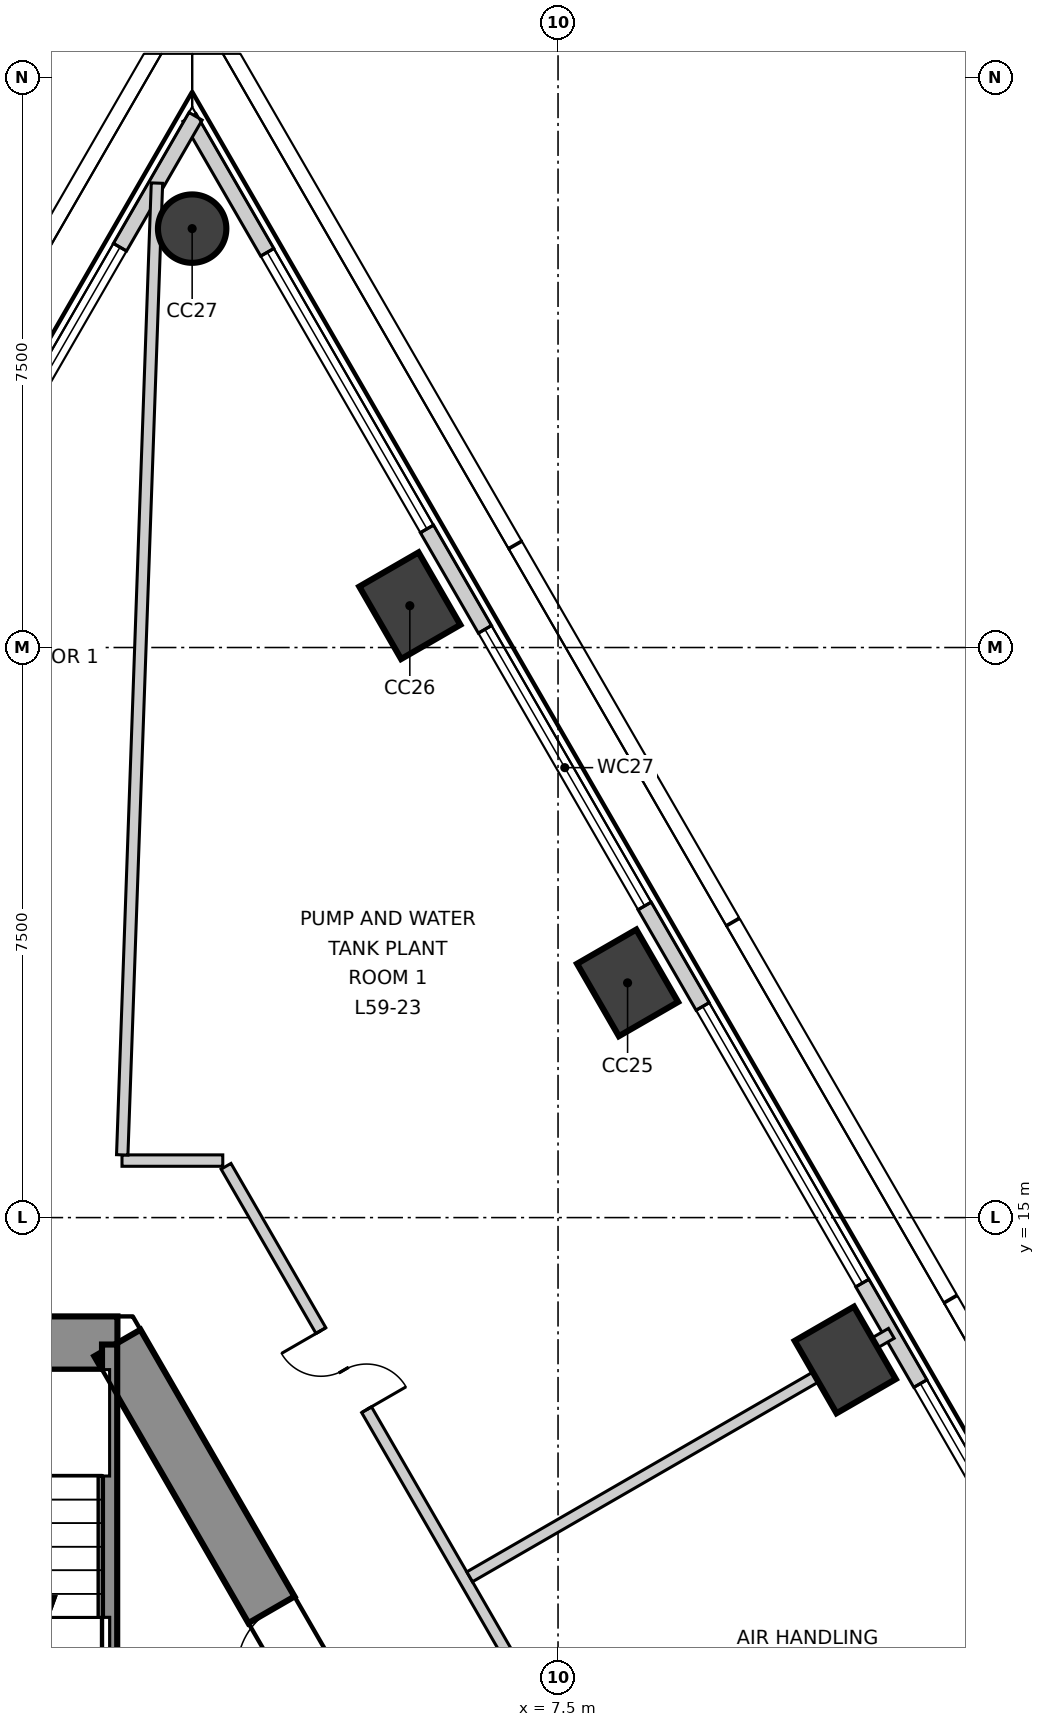
"""IFC4 building model, lengths in metres.
Left out: names, types, materials, properties, quantities, classifications, styles, units other than length and angle.
Written with IfcOpenShell. Run it as: python <this file> out.ifc"""

import sys

from ifc_helpers import new_model, si_unit, direction, frame, frame_2d, origin, origin_2d, place, context, subcontext, project, spatial, polyline, rectangle, circle, outline, extrude, element, fill, save


model = new_model("IFC4")
c1 = context("Model", 3, precision=1e-05, world=origin(), true_north=direction((0.0, 1.0)))
c2 = subcontext(c1, "Body", "Model", "MODEL_VIEW")
j1 = project(units=[si_unit("LENGTHUNIT", "METRE"), si_unit("PLANEANGLEUNIT", "RADIAN")], contexts=[c1])
p1 = place(None, origin())
s1 = spatial("IfcSite", under=j1, at=p1, CompositionType="ELEMENT")
p2 = place(p1, origin())
s2 = spatial("IfcBuilding", under=s1, at=p2, CompositionType="ELEMENT")
p3 = place(p2, frame((0.0, 0.0, 251.3)))
s3 = spatial("IfcBuildingStorey", under=s2, at=p3, CompositionType="ELEMENT", Elevation=251.3)
p4 = place(p3, frame((1.703, 13.35, -0.3), z_axis=(0.0, 0.0, 1.0), x_axis=(-1.0, 0.0, 0.0)))
e1 = element("IfcWall", 1, at=p4, inside=s3, PredefinedType="SHEAR", context=c2, shape_type="SweptSolid", body=[
    extrude(outline(polyline([(-0.202, -0.35), (1.703, -0.35), (3.608, -0.35), (3.204, 0.35), (1.703, 0.35), (0.202, 0.35), (-0.202, -0.35)])), origin(), (0.0, 0.0, 1.0), 4.2),
])
p5 = place(p4, frame((1.553, 0.0, 0.3)))
e2 = element("IfcOpeningElement", 2, at=p5, cuts=e1, PredefinedType="OPENING", context=c2, shape_type="SweptSolid", body=[
    extrude(rectangle(XDim=1.4, YDim=2.1, at=frame_2d((0.7, 1.05))), frame((0.0, 0.36, 0.0), z_axis=(0.0, -1.0, 0.0), x_axis=(1.0, 0.0, 0.0)), (0.0, 0.0, 1.0), 0.72),
])
p6 = place(p3, frame((12.413, -5.2, -0.3), z_axis=(0.0, 0.0, 1.0), x_axis=(-0.500011533395, 0.866018744874, 0.0)))
e3 = element("IfcWall", 3, at=p6, inside=s3, PredefinedType="SHEAR", context=c2, shape_type="SweptSolid", body=[
    extrude(outline(polyline([(-0.202, -0.35), (1.782, -0.35), (3.766, -0.35), (5.75, -0.35), (7.734, -0.35), (9.718, -0.35), (11.702, -0.35), (13.686, -0.35), (15.67, -0.35), (17.654, -0.35), (19.638, -0.35), (21.622, -0.35), (21.218, 0.35), (19.307, 0.35), (17.397, 0.35), (15.486, 0.35), (13.576, 0.35), (11.665, 0.35), (9.755, 0.35), (7.844, 0.35), (5.934, 0.35), (4.023, 0.35), (2.113, 0.35), (0.202, 0.35), (-0.202, -0.35)])), origin(), (0.0, 0.0, 1.0), 4.2),
])
p7 = place(p6, frame((4.055, 0.0, 0.3)))
e4 = element("IfcOpeningElement", 4, at=p7, cuts=e3, PredefinedType="OPENING", context=c2, shape_type="SweptSolid", body=[
    extrude(rectangle(XDim=0.9, YDim=2.1, at=frame_2d((0.45, 1.05))), frame((0.0, 0.36, 0.0), z_axis=(0.0, -1.0, 0.0), x_axis=(1.0, 0.0, 0.0)), (0.0, 0.0, 1.0), 0.72),
])
p8 = place(p6, frame((16.465, 0.0, 0.3)))
e5 = element("IfcOpeningElement", 5, at=p8, cuts=e3, PredefinedType="OPENING", context=c2, shape_type="SweptSolid", body=[
    extrude(rectangle(XDim=0.9, YDim=2.1, at=frame_2d((0.45, 1.05))), frame((0.0, 0.36, 0.0), z_axis=(0.0, -1.0, 0.0), x_axis=(1.0, 0.0, 0.0)), (0.0, 0.0, 1.0), 0.72),
])
for number, where, z_axis, x_axis in (
    (6, (11.279, 13.127, -0.3), (0.0, 0.0, 1.0), (-0.5, 0.866, 0.0)),
    (7, (8.415, 18.088, -0.3), (0.0, 0.0, 1.0), (-0.5, 0.866, 0.0)),
    (8, (5.55, 23.05, -0.3), (0.0, 0.0, 1.0), (-0.5, 0.866, 0.0)),
):
    element("IfcColumn", number, at=place(p3, frame(where, z_axis=z_axis, x_axis=x_axis)), inside=s3, PredefinedType="COLUMN", context=c2, shape_type="SweptSolid", body=[
        extrude(rectangle(XDim=1.1, YDim=0.9, at=origin_2d()), origin(), (0.0, 0.0, 1.0), 4.2),
    ])
p9 = place(p3, frame((2.686, 28.011, -0.3), z_axis=(0.0, 0.0, 1.0), x_axis=(-0.5, 0.866025403784, 0.0)))
e9 = element("IfcColumn", 9, at=p9, inside=s3, PredefinedType="COLUMN", context=c2, shape_type="SweptSolid", body=[
    extrude(circle(Radius=0.45, at=origin_2d()), origin(), (0.0, 0.0, 1.0), 4.2),
])
p10 = place(p3, frame((26.859, -12.457, 0.0), z_axis=(0.0, 0.0, 1.0), x_axis=(-0.500004868955, 0.866022592674, 0.0)))
e10 = element("IfcWall", 10, at=p10, inside=s3, PredefinedType="ELEMENTEDWALL", context=c2, shape_type="SweptSolid", body=[
    extrude(rectangle(XDim=48.416, YDim=0.2, at=frame_2d((24.208, 0.0))), origin(), (0.0, 0.0, 1.0), 3.9),
])
p11 = place(p10, frame((2.067, 0.0, 0.9)))
e11 = element("IfcOpeningElement", 11, at=p11, cuts=e10, PredefinedType="OPENING", context=c2, shape_type="SweptSolid", body=[
    extrude(rectangle(XDim=4.2, YDim=2.5, at=frame_2d((2.1, 1.25))), frame((0.0, 0.11, 0.0), z_axis=(0.0, -1.0, 0.0), x_axis=(1.0, 0.0, 0.0)), (0.0, 0.0, 1.0), 0.22),
])
p12 = place(p10, frame((7.796, 0.0, 0.9)))
e12 = element("IfcOpeningElement", 12, at=p12, cuts=e10, PredefinedType="OPENING", context=c2, shape_type="SweptSolid", body=[
    extrude(rectangle(XDim=4.2, YDim=2.5, at=frame_2d((2.1, 1.25))), frame((0.0, 0.11, 0.0), z_axis=(0.0, -1.0, 0.0), x_axis=(1.0, 0.0, 0.0)), (0.0, 0.0, 1.0), 0.22),
])
p13 = place(p10, frame((13.525, 0.0, 0.9)))
e13 = element("IfcOpeningElement", 13, at=p13, cuts=e10, PredefinedType="OPENING", context=c2, shape_type="SweptSolid", body=[
    extrude(rectangle(XDim=4.2, YDim=2.5, at=frame_2d((2.1, 1.25))), frame((0.0, 0.11, 0.0), z_axis=(0.0, -1.0, 0.0), x_axis=(1.0, 0.0, 0.0)), (0.0, 0.0, 1.0), 0.22),
])
p14 = place(p10, frame((19.253, 0.0, 0.9)))
e14 = element("IfcOpeningElement", 14, at=p14, cuts=e10, PredefinedType="OPENING", context=c2, shape_type="SweptSolid", body=[
    extrude(rectangle(XDim=4.2, YDim=2.5, at=frame_2d((2.1, 1.25))), frame((0.0, 0.11, 0.0), z_axis=(0.0, -1.0, 0.0), x_axis=(1.0, 0.0, 0.0)), (0.0, 0.0, 1.0), 0.22),
])
p15 = place(p10, frame((24.982, 0.0, 0.9)))
e15 = element("IfcOpeningElement", 15, at=p15, cuts=e10, PredefinedType="OPENING", context=c2, shape_type="SweptSolid", body=[
    extrude(rectangle(XDim=4.2, YDim=2.5, at=frame_2d((2.1, 1.25))), frame((0.0, 0.11, 0.0), z_axis=(0.0, -1.0, 0.0), x_axis=(1.0, 0.0, 0.0)), (0.0, 0.0, 1.0), 0.22),
])
p16 = place(p10, frame((30.711, 0.0, 0.9)))
e16 = element("IfcOpeningElement", 16, at=p16, cuts=e10, PredefinedType="OPENING", context=c2, shape_type="SweptSolid", body=[
    extrude(rectangle(XDim=4.2, YDim=2.5, at=frame_2d((2.1, 1.25))), frame((0.0, 0.11, 0.0), z_axis=(0.0, -1.0, 0.0), x_axis=(1.0, 0.0, 0.0)), (0.0, 0.0, 1.0), 0.22),
])
p17 = place(p10, frame((36.44, 0.0, 0.9)))
e17 = element("IfcOpeningElement", 17, at=p17, cuts=e10, PredefinedType="OPENING", context=c2, shape_type="SweptSolid", body=[
    extrude(rectangle(XDim=4.2, YDim=2.5, at=frame_2d((2.1, 1.25))), frame((0.0, 0.11, 0.0), z_axis=(0.0, -1.0, 0.0), x_axis=(1.0, 0.0, 0.0)), (0.0, 0.0, 1.0), 0.22),
])
p18 = place(p10, frame((42.168, 0.0, 0.9)))
e18 = element("IfcOpeningElement", 18, at=p18, cuts=e10, PredefinedType="OPENING", context=c2, shape_type="SweptSolid", body=[
    extrude(rectangle(XDim=4.2, YDim=2.5, at=frame_2d((2.1, 1.25))), frame((0.0, 0.11, 0.0), z_axis=(0.0, -1.0, 0.0), x_axis=(1.0, 0.0, 0.0)), (0.0, 0.0, 1.0), 0.22),
])
p19 = place(p3, frame((2.731, 29.489, 0.0), z_axis=(0.0, 0.0, 1.0), x_axis=(-0.499969493036, -0.866043016272, 0.0)))
e19 = element("IfcWall", 19, at=p19, inside=s3, PredefinedType="ELEMENTEDWALL", context=c2, shape_type="SweptSolid", body=[
    extrude(rectangle(XDim=5.532, YDim=0.2, at=frame_2d((2.766, 0.0))), origin(), (0.0, 0.0, 1.0), 3.9),
])
p20 = place(p19, frame((1.99, 0.0, 0.9)))
e20 = element("IfcOpeningElement", 20, at=p20, cuts=e19, PredefinedType="OPENING", context=c2, shape_type="SweptSolid", body=[
    extrude(rectangle(XDim=2.1, YDim=2.5, at=frame_2d((1.05, 1.25))), frame((0.0, 0.11, 0.0), z_axis=(0.0, -1.0, 0.0), x_axis=(1.0, 0.0, 0.0)), (0.0, 0.0, 1.0), 0.22),
])
p21 = place(p3, frame((1.763, 15.75, 0.0), z_axis=(0.0, 0.0, 1.0), x_axis=(1.0, 0.0, 0.0)))
e21 = element("IfcWall", 21, at=p21, inside=s3, PredefinedType="PARTITIONING", context=c2, shape_type="SweptSolid", body=[
    extrude(rectangle(XDim=1.326, YDim=0.15, at=frame_2d((0.663, 0.0))), origin(), (0.0, 0.0, 1.0), 3.9),
])
p22 = place(p3, frame((3.132, 15.675, 0.0), z_axis=(0.0, 0.0, 1.0), x_axis=(0.499994246357, -0.866028725626, 0.0)))
e22 = element("IfcWall", 22, at=p22, inside=s3, PredefinedType="PARTITIONING", context=c2, shape_type="SweptSolid", body=[
    extrude(rectangle(XDim=24.104, YDim=0.15, at=frame_2d((12.052, 0.0))), origin(), (0.0, 0.0, 1.0), 3.9),
])
p23 = place(p22, frame((20.321, 0.0, 0.0)))
e23 = element("IfcOpeningElement", 23, at=p23, cuts=e22, PredefinedType="OPENING", context=c2, shape_type="SweptSolid", body=[
    extrude(rectangle(XDim=1.2, YDim=2.1, at=frame_2d((0.6, 1.05))), frame((0.0, 0.085, 0.0), z_axis=(0.0, -1.0, 0.0), x_axis=(1.0, 0.0, 0.0)), (0.0, 0.0, 1.0), 0.17),
])
p24 = place(p22, frame((11.508, 0.0, 0.0)))
e24 = element("IfcOpeningElement", 24, at=p24, cuts=e22, PredefinedType="OPENING", context=c2, shape_type="SweptSolid", body=[
    extrude(rectangle(XDim=1.0, YDim=2.1, at=frame_2d((0.5, 1.05))), frame((0.0, 0.085, 0.0), z_axis=(0.0, -1.0, 0.0), x_axis=(1.0, 0.0, 0.0)), (0.0, 0.0, 1.0), 0.17),
])
p25 = place(p22, frame((2.497, 0.0, 0.0)))
e25 = element("IfcOpeningElement", 25, at=p25, cuts=e22, PredefinedType="OPENING", context=c2, shape_type="SweptSolid", body=[
    extrude(rectangle(XDim=1.2, YDim=2.1, at=frame_2d((0.6, 1.05))), frame((0.0, 0.085, 0.0), z_axis=(0.0, -1.0, 0.0), x_axis=(1.0, 0.0, 0.0)), (0.0, 0.0, 1.0), 0.17),
])
p26 = place(p3, frame((1.766, 15.825, 0.0), z_axis=(0.0, 0.0, 1.0), x_axis=(0.035705144184, 0.999362368052, 0.0)))
e26 = element("IfcWall", 26, at=p26, inside=s3, PredefinedType="PARTITIONING", context=c2, shape_type="SweptSolid", body=[
    extrude(rectangle(XDim=12.793, YDim=0.15, at=frame_2d((6.396, 0.0))), origin(), (0.0, 0.0, 1.0), 3.3),
])
p27 = place(p3, frame((6.337, 10.274, 0.0), z_axis=(0.0, 0.0, 1.0), x_axis=(0.866030104553, 0.499991857942, 0.0)))
e27 = element("IfcWall", 27, at=p27, inside=s3, PredefinedType="PARTITIONING", context=c2, shape_type="SweptSolid", body=[
    extrude(rectangle(XDim=6.406, YDim=0.15, at=frame_2d((3.203, 0.0))), origin(), (0.0, 0.0, 1.0), 3.9),
])
p28 = place(p3, frame((1.6, 6.615, 0.0), z_axis=(0.0, 0.0, 1.0), x_axis=(0.0, 1.0, 0.0)))
e28 = element("IfcWall", 28, at=p28, inside=s3, PredefinedType="SOLIDWALL", context=c2, shape_type="SweptSolid", body=[
    extrude(rectangle(XDim=6.715, YDim=0.2, at=frame_2d((3.357, 0.0))), origin(), (0.0, 0.0, 1.0), 3.9),
])
p29 = place(p15, origin())
e29 = element("IfcWindow", 29, at=p29, inside=s3, PartitioningType="SINGLE_PANEL", PredefinedType="WINDOW", context=c2, shape_type="SweptSolid", body=[
    extrude(rectangle(XDim=4.2, YDim=2.5, at=frame_2d((2.1, 1.25))), frame((0.0, 0.03, 0.0), z_axis=(0.0, -1.0, 0.0), x_axis=(1.0, 0.0, 0.0)), (0.0, 0.0, 1.0), 0.06),
])
fill(e15, e29)
p30 = place(p16, origin())
e30 = element("IfcWindow", 30, at=p30, inside=s3, PartitioningType="SINGLE_PANEL", PredefinedType="WINDOW", context=c2, shape_type="SweptSolid", body=[
    extrude(rectangle(XDim=4.2, YDim=2.5, at=frame_2d((2.1, 1.25))), frame((0.0, 0.03, 0.0), z_axis=(0.0, -1.0, 0.0), x_axis=(1.0, 0.0, 0.0)), (0.0, 0.0, 1.0), 0.06),
])
fill(e16, e30)
p31 = place(p17, origin())
e31 = element("IfcWindow", 31, at=p31, inside=s3, PartitioningType="SINGLE_PANEL", PredefinedType="WINDOW", context=c2, shape_type="SweptSolid", body=[
    extrude(rectangle(XDim=4.2, YDim=2.5, at=frame_2d((2.1, 1.25))), frame((0.0, 0.03, 0.0), z_axis=(0.0, -1.0, 0.0), x_axis=(1.0, 0.0, 0.0)), (0.0, 0.0, 1.0), 0.06),
])
fill(e17, e31)
p32 = place(p18, origin())
e32 = element("IfcWindow", 32, at=p32, inside=s3, PartitioningType="SINGLE_PANEL", PredefinedType="WINDOW", context=c2, shape_type="SweptSolid", body=[
    extrude(rectangle(XDim=4.2, YDim=2.5, at=frame_2d((2.1, 1.25))), frame((0.0, 0.03, 0.0), z_axis=(0.0, -1.0, 0.0), x_axis=(1.0, 0.0, 0.0)), (0.0, 0.0, 1.0), 0.06),
])
fill(e18, e32)
p33 = place(p20, origin())
e33 = element("IfcWindow", 33, at=p33, inside=s3, PartitioningType="SINGLE_PANEL", PredefinedType="WINDOW", context=c2, shape_type="SweptSolid", body=[
    extrude(rectangle(XDim=2.1, YDim=2.5, at=frame_2d((1.05, 1.25))), frame((0.0, 0.03, 0.0), z_axis=(0.0, -1.0, 0.0), x_axis=(1.0, 0.0, 0.0)), (0.0, 0.0, 1.0), 0.06),
])
fill(e20, e33)
p34 = place(p25, origin())
e34 = element("IfcDoor", 34, at=p34, inside=s3, OperationType="DOUBLE_DOOR_SINGLE_SWING", PredefinedType="DOOR", context=c2, shape_type="SweptSolid", body=[
    extrude(rectangle(XDim=1.2, YDim=2.1, at=frame_2d((0.6, 1.05))), frame((0.0, 0.025, 0.0), z_axis=(0.0, -1.0, 0.0), x_axis=(1.0, 0.0, 0.0)), (0.0, 0.0, 1.0), 0.05),
])
fill(e25, e34)
p35 = place(p8, origin())
e35 = element("IfcDoor", 35, at=p35, inside=s3, OperationType="SINGLE_SWING_RIGHT", PredefinedType="DOOR", context=c2, shape_type="SweptSolid", body=[
    extrude(rectangle(XDim=0.9, YDim=2.1, at=frame_2d((0.45, 1.05))), frame((0.0, 0.025, 0.0), z_axis=(0.0, -1.0, 0.0), x_axis=(1.0, 0.0, 0.0)), (0.0, 0.0, 1.0), 0.05),
])
fill(e5, e35)
save(model, sys.argv[1])
